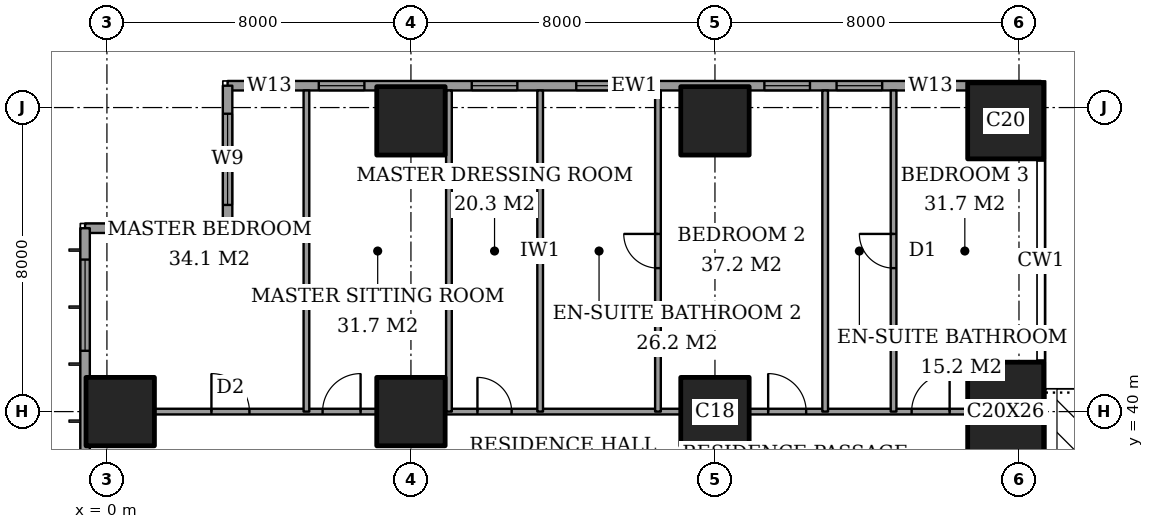
"""IFC4 building model, lengths in metres.
Left out: names, types, materials, properties, quantities, classifications, styles, units other than length and angle.
Written with IfcOpenShell. Run it as: python <this file> out.ifc"""

import sys

from ifc_helpers import new_model, si_unit, direction, frame, frame_2d, origin, origin_2d, place, context, subcontext, project, spatial, rectangle, extrude, element, fill, save


model = new_model("IFC4")
c1 = context("Model", 3, precision=1e-05, world=origin(), true_north=direction((0.0, 1.0)))
c2 = subcontext(c1, "Body", "Model", "MODEL_VIEW")
j1 = project(units=[si_unit("LENGTHUNIT", "METRE"), si_unit("PLANEANGLEUNIT", "RADIAN")], contexts=[c1])
p1 = place(None, origin())
s1 = spatial("IfcSite", under=j1, at=p1, CompositionType="ELEMENT")
p2 = place(p1, origin())
s2 = spatial("IfcBuilding", under=s1, at=p2, CompositionType="ELEMENT")
p3 = place(p2, frame((0.0, 0.0, 182.2)))
s3 = spatial("IfcBuildingStorey", under=s2, at=p3, CompositionType="ELEMENT", Elevation=182.2)
for number, where, z_axis, x_axis in (
    (1, (0.35, 40.0, 0.0), (0.0, 0.0, 1.0), (1.0, 0.0, 0.0)),
    (2, (8.0, 40.0, 0.0), (0.0, 0.0, 1.0), (1.0, 0.0, 0.0)),
    (3, (8.0, 47.65, 0.0), (0.0, 0.0, 1.0), (1.0, 0.0, 0.0)),
    (4, (16.0, 40.0, 0.0), (0.0, 0.0, 1.0), (1.0, 0.0, 0.0)),
    (5, (16.0, 47.65, 0.0), (0.0, 0.0, 1.0), (1.0, 0.0, 0.0)),
):
    element("IfcColumn", number, at=place(p3, frame(where, z_axis=z_axis, x_axis=x_axis)), inside=s3, PredefinedType="COLUMN", context=c2, shape_type="SweptSolid", body=[
        extrude(rectangle(XDim=1.8, YDim=1.8, at=origin_2d()), origin(), (0.0, 0.0, 1.0), 3.6),
    ])
p4 = place(p3, frame((23.65, 40.0, 0.0), z_axis=(0.0, 0.0, 1.0), x_axis=(1.0, 0.0, 0.0)))
e6 = element("IfcColumn", 6, at=p4, inside=s3, PredefinedType="COLUMN", context=c2, shape_type="SweptSolid", body=[
    extrude(rectangle(XDim=2.0, YDim=2.6, at=origin_2d()), origin(), (0.0, 0.0, 1.0), 3.6),
])
p5 = place(p3, frame((23.65, 47.65, 0.0), z_axis=(0.0, 0.0, 1.0), x_axis=(1.0, 0.0, 0.0)))
e7 = element("IfcColumn", 7, at=p5, inside=s3, PredefinedType="COLUMN", context=c2, shape_type="SweptSolid", body=[
    extrude(rectangle(XDim=2.0, YDim=2.0, at=origin_2d()), origin(), (0.0, 0.0, 1.0), 3.6),
])
p6 = place(p3, frame((24.575, 48.575, 0.0), z_axis=(0.0, 0.0, 1.0), x_axis=(-1.0, 0.0, 0.0)))
e8 = element("IfcWall", 8, at=p6, inside=s3, PredefinedType="SOLIDWALL", context=c2, shape_type="SweptSolid", body=[
    extrude(rectangle(XDim=21.4, YDim=0.25, at=frame_2d((10.7, 0.0))), origin(), (0.0, 0.0, 1.0), 3.6),
])
p7 = place(p6, frame((2.3, 0.0, 0.2)))
e9 = element("IfcOpeningElement", 9, at=p7, cuts=e8, PredefinedType="OPENING", context=c2, shape_type="SweptSolid", body=[
    extrude(rectangle(XDim=1.2, YDim=2.4, at=frame_2d((0.6, 1.2))), frame((0.0, 0.135, 0.0), z_axis=(0.0, -1.0, 0.0), x_axis=(1.0, 0.0, 0.0)), (0.0, 0.0, 1.0), 0.27),
])
p8 = place(p6, frame((4.175, 0.0, 0.2)))
e10 = element("IfcOpeningElement", 10, at=p8, cuts=e8, PredefinedType="OPENING", context=c2, shape_type="SweptSolid", body=[
    extrude(rectangle(XDim=1.2, YDim=2.4, at=frame_2d((0.6, 1.2))), frame((0.0, 0.135, 0.0), z_axis=(0.0, -1.0, 0.0), x_axis=(1.0, 0.0, 0.0)), (0.0, 0.0, 1.0), 0.27),
])
p9 = place(p6, frame((6.075, 0.0, 0.2)))
e11 = element("IfcOpeningElement", 11, at=p9, cuts=e8, PredefinedType="OPENING", context=c2, shape_type="SweptSolid", body=[
    extrude(rectangle(XDim=1.2, YDim=2.4, at=frame_2d((0.6, 1.2))), frame((0.0, 0.135, 0.0), z_axis=(0.0, -1.0, 0.0), x_axis=(1.0, 0.0, 0.0)), (0.0, 0.0, 1.0), 0.27),
])
p10 = place(p6, frame((11.025, 0.0, 0.2)))
e12 = element("IfcOpeningElement", 12, at=p10, cuts=e8, PredefinedType="OPENING", context=c2, shape_type="SweptSolid", body=[
    extrude(rectangle(XDim=1.2, YDim=2.4, at=frame_2d((0.6, 1.2))), frame((0.0, 0.135, 0.0), z_axis=(0.0, -1.0, 0.0), x_axis=(1.0, 0.0, 0.0)), (0.0, 0.0, 1.0), 0.27),
])
p11 = place(p6, frame((13.775, 0.0, 0.2)))
e13 = element("IfcOpeningElement", 13, at=p11, cuts=e8, PredefinedType="OPENING", context=c2, shape_type="SweptSolid", body=[
    extrude(rectangle(XDim=1.2, YDim=2.4, at=frame_2d((0.6, 1.2))), frame((0.0, 0.135, 0.0), z_axis=(0.0, -1.0, 0.0), x_axis=(1.0, 0.0, 0.0)), (0.0, 0.0, 1.0), 0.27),
])
p12 = place(p6, frame((17.8, 0.0, 0.2)))
e14 = element("IfcOpeningElement", 14, at=p12, cuts=e8, PredefinedType="OPENING", context=c2, shape_type="SweptSolid", body=[
    extrude(rectangle(XDim=1.2, YDim=2.4, at=frame_2d((0.6, 1.2))), frame((0.0, 0.135, 0.0), z_axis=(0.0, -1.0, 0.0), x_axis=(1.0, 0.0, 0.0)), (0.0, 0.0, 1.0), 0.27),
])
p13 = place(p6, frame((19.7, 0.0, 0.2)))
e15 = element("IfcOpeningElement", 15, at=p13, cuts=e8, PredefinedType="OPENING", context=c2, shape_type="SweptSolid", body=[
    extrude(rectangle(XDim=1.2, YDim=2.4, at=frame_2d((0.6, 1.2))), frame((0.0, 0.135, 0.0), z_axis=(0.0, -1.0, 0.0), x_axis=(1.0, 0.0, 0.0)), (0.0, 0.0, 1.0), 0.27),
])
p14 = place(p3, frame((3.175, 48.575, 0.0), z_axis=(0.0, 0.0, 1.0), x_axis=(0.0, -1.0, 0.0)))
e16 = element("IfcWall", 16, at=p14, inside=s3, PredefinedType="SOLIDWALL", context=c2, shape_type="SweptSolid", body=[
    extrude(rectangle(XDim=3.75, YDim=0.25, at=frame_2d((1.875, 0.0))), origin(), (0.0, 0.0, 1.0), 3.6),
])
p15 = place(p14, frame((0.738, 0.0, 0.2)))
e17 = element("IfcOpeningElement", 17, at=p15, cuts=e16, PredefinedType="OPENING", context=c2, shape_type="SweptSolid", body=[
    extrude(rectangle(XDim=2.4, YDim=2.4, at=frame_2d((1.2, 1.2))), frame((0.0, 0.135, 0.0), z_axis=(0.0, -1.0, 0.0), x_axis=(1.0, 0.0, 0.0)), (0.0, 0.0, 1.0), 0.27),
])
p16 = place(p3, frame((3.175, 44.825, 0.0), z_axis=(0.0, 0.0, 1.0), x_axis=(-1.0, 0.0, 0.0)))
e18 = element("IfcWall", 18, at=p16, inside=s3, PredefinedType="SOLIDWALL", context=c2, shape_type="SweptSolid", body=[
    extrude(rectangle(XDim=3.75, YDim=0.25, at=frame_2d((1.875, 0.0))), origin(), (0.0, 0.0, 1.0), 3.6),
])
p17 = place(p16, frame((0.613, 0.0, 0.2)))
e19 = element("IfcOpeningElement", 19, at=p17, cuts=e18, PredefinedType="OPENING", context=c2, shape_type="SweptSolid", body=[
    extrude(rectangle(XDim=2.4, YDim=2.4, at=frame_2d((1.2, 1.2))), frame((0.0, 0.135, 0.0), z_axis=(0.0, -1.0, 0.0), x_axis=(1.0, 0.0, 0.0)), (0.0, 0.0, 1.0), 0.27),
])
p18 = place(p3, frame((-0.575, 44.825, 0.0), z_axis=(0.0, 0.0, 1.0), x_axis=(0.0, -1.0, 0.0)))
e20 = element("IfcWall", 20, at=p18, inside=s3, PredefinedType="SOLIDWALL", context=c2, shape_type="SweptSolid", body=[
    extrude(rectangle(XDim=41.65, YDim=0.25, at=frame_2d((20.825, 0.0))), origin(), (0.0, 0.0, 1.0), 3.6),
])
p19 = place(p18, frame((0.825, 0.0, 0.2)))
e21 = element("IfcOpeningElement", 21, at=p19, cuts=e20, PredefinedType="OPENING", context=c2, shape_type="SweptSolid", body=[
    extrude(rectangle(XDim=2.4, YDim=2.4, at=frame_2d((1.2, 1.2))), frame((0.0, 0.135, 0.0), z_axis=(0.0, -1.0, 0.0), x_axis=(1.0, 0.0, 0.0)), (0.0, 0.0, 1.0), 0.27),
])
p20 = place(p18, frame((6.05, 0.0, 0.2)))
e22 = element("IfcOpeningElement", 22, at=p20, cuts=e20, PredefinedType="OPENING", context=c2, shape_type="SweptSolid", body=[
    extrude(rectangle(XDim=1.2, YDim=2.4, at=frame_2d((0.6, 1.2))), frame((0.0, 0.135, 0.0), z_axis=(0.0, -1.0, 0.0), x_axis=(1.0, 0.0, 0.0)), (0.0, 0.0, 1.0), 0.27),
])
p21 = place(p18, frame((8.475, 0.0, 0.2)))
e23 = element("IfcOpeningElement", 23, at=p21, cuts=e20, PredefinedType="OPENING", context=c2, shape_type="SweptSolid", body=[
    extrude(rectangle(XDim=2.4, YDim=2.4, at=frame_2d((1.2, 1.2))), frame((0.0, 0.135, 0.0), z_axis=(0.0, -1.0, 0.0), x_axis=(1.0, 0.0, 0.0)), (0.0, 0.0, 1.0), 0.27),
])
p22 = place(p18, frame((15.625, 0.0, 0.2)))
e24 = element("IfcOpeningElement", 24, at=p22, cuts=e20, PredefinedType="OPENING", context=c2, shape_type="SweptSolid", body=[
    extrude(rectangle(XDim=2.4, YDim=2.4, at=frame_2d((1.2, 1.2))), frame((0.0, 0.135, 0.0), z_axis=(0.0, -1.0, 0.0), x_axis=(1.0, 0.0, 0.0)), (0.0, 0.0, 1.0), 0.27),
])
p23 = place(p18, frame((23.625, 0.0, 0.2)))
e25 = element("IfcOpeningElement", 25, at=p23, cuts=e20, PredefinedType="OPENING", context=c2, shape_type="SweptSolid", body=[
    extrude(rectangle(XDim=2.4, YDim=2.4, at=frame_2d((1.2, 1.2))), frame((0.0, 0.135, 0.0), z_axis=(0.0, -1.0, 0.0), x_axis=(1.0, 0.0, 0.0)), (0.0, 0.0, 1.0), 0.27),
])
p24 = place(p18, frame((30.775, 0.0, 0.2)))
e26 = element("IfcOpeningElement", 26, at=p24, cuts=e20, PredefinedType="OPENING", context=c2, shape_type="SweptSolid", body=[
    extrude(rectangle(XDim=2.4, YDim=2.4, at=frame_2d((1.2, 1.2))), frame((0.0, 0.135, 0.0), z_axis=(0.0, -1.0, 0.0), x_axis=(1.0, 0.0, 0.0)), (0.0, 0.0, 1.0), 0.27),
])
p25 = place(p18, frame((34.55, 0.0, 0.2)))
e27 = element("IfcOpeningElement", 27, at=p25, cuts=e20, PredefinedType="OPENING", context=c2, shape_type="SweptSolid", body=[
    extrude(rectangle(XDim=1.2, YDim=2.4, at=frame_2d((0.6, 1.2))), frame((0.0, 0.135, 0.0), z_axis=(0.0, -1.0, 0.0), x_axis=(1.0, 0.0, 0.0)), (0.0, 0.0, 1.0), 0.27),
])
p26 = place(p18, frame((38.425, 0.0, 0.2)))
e28 = element("IfcOpeningElement", 28, at=p26, cuts=e20, PredefinedType="OPENING", context=c2, shape_type="SweptSolid", body=[
    extrude(rectangle(XDim=2.4, YDim=2.4, at=frame_2d((1.2, 1.2))), frame((0.0, 0.135, 0.0), z_axis=(0.0, -1.0, 0.0), x_axis=(1.0, 0.0, 0.0)), (0.0, 0.0, 1.0), 0.27),
])
p27 = place(p3, frame((1.25, 40.0, 0.0), z_axis=(0.0, 0.0, 1.0), x_axis=(1.0, 0.0, 0.0)))
e29 = element("IfcWall", 29, at=p27, inside=s3, PredefinedType="PARTITIONING", context=c2, shape_type="SweptSolid", body=[
    extrude(rectangle(XDim=5.85, YDim=0.15, at=frame_2d((2.925, 0.0))), origin(), (0.0, 0.0, 1.0), 3.35),
])
p28 = place(p27, frame((1.5, 0.0, 0.0)))
e30 = element("IfcOpeningElement", 30, at=p28, cuts=e29, PredefinedType="OPENING", context=c2, shape_type="SweptSolid", body=[
    extrude(rectangle(XDim=1.0, YDim=2.1, at=frame_2d((0.5, 1.05))), frame((0.0, 0.085, 0.0), z_axis=(0.0, -1.0, 0.0), x_axis=(1.0, 0.0, 0.0)), (0.0, 0.0, 1.0), 0.17),
])
p29 = place(p27, frame((4.425, 0.0, 0.0)))
e31 = element("IfcOpeningElement", 31, at=p29, cuts=e29, PredefinedType="OPENING", context=c2, shape_type="SweptSolid", body=[
    extrude(rectangle(XDim=1.0, YDim=2.1, at=frame_2d((0.5, 1.05))), frame((0.0, 0.085, 0.0), z_axis=(0.0, -1.0, 0.0), x_axis=(1.0, 0.0, 0.0)), (0.0, 0.0, 1.0), 0.17),
])
p30 = place(p3, frame((8.9, 40.0, 0.0), z_axis=(0.0, 0.0, 1.0), x_axis=(1.0, 0.0, 0.0)))
e32 = element("IfcWall", 32, at=p30, inside=s3, PredefinedType="PARTITIONING", context=c2, shape_type="SweptSolid", body=[
    extrude(rectangle(XDim=6.2, YDim=0.15, at=frame_2d((3.1, 0.0))), origin(), (0.0, 0.0, 1.0), 3.35),
])
p31 = place(p30, frame((0.85, 0.0, 0.0)))
e33 = element("IfcOpeningElement", 33, at=p31, cuts=e32, PredefinedType="OPENING", context=c2, shape_type="SweptSolid", body=[
    extrude(rectangle(XDim=0.9, YDim=2.1, at=frame_2d((0.45, 1.05))), frame((0.0, 0.085, 0.0), z_axis=(0.0, -1.0, 0.0), x_axis=(1.0, 0.0, 0.0)), (0.0, 0.0, 1.0), 0.17),
])
p32 = place(p3, frame((16.9, 40.0, 0.0), z_axis=(0.0, 0.0, 1.0), x_axis=(1.0, 0.0, 0.0)))
e34 = element("IfcWall", 34, at=p32, inside=s3, PredefinedType="PARTITIONING", context=c2, shape_type="SweptSolid", body=[
    extrude(rectangle(XDim=5.75, YDim=0.15, at=frame_2d((2.875, 0.0))), origin(), (0.0, 0.0, 1.0), 3.35),
])
p33 = place(p32, frame((0.5, 0.0, 0.0)))
e35 = element("IfcOpeningElement", 35, at=p33, cuts=e34, PredefinedType="OPENING", context=c2, shape_type="SweptSolid", body=[
    extrude(rectangle(XDim=1.0, YDim=2.1, at=frame_2d((0.5, 1.05))), frame((0.0, 0.085, 0.0), z_axis=(0.0, -1.0, 0.0), x_axis=(1.0, 0.0, 0.0)), (0.0, 0.0, 1.0), 0.17),
])
p34 = place(p32, frame((4.275, 0.0, 0.0)))
e36 = element("IfcOpeningElement", 36, at=p34, cuts=e34, PredefinedType="OPENING", context=c2, shape_type="SweptSolid", body=[
    extrude(rectangle(XDim=1.0, YDim=2.1, at=frame_2d((0.5, 1.05))), frame((0.0, 0.085, 0.0), z_axis=(0.0, -1.0, 0.0), x_axis=(1.0, 0.0, 0.0)), (0.0, 0.0, 1.0), 0.17),
])
for number, where, z_axis, x_axis in (
    (37, (5.25, 40.0, 0.0), (0.0, 0.0, 1.0), (0.0, 1.0, 0.0)),
    (38, (9.0, 40.0, 0.0), (0.0, 0.0, 1.0), (0.0, 1.0, 0.0)),
    (39, (11.4, 40.0, 0.0), (0.0, 0.0, 1.0), (0.0, 1.0, 0.0)),
):
    element("IfcWall", number, at=place(p3, frame(where, z_axis=z_axis, x_axis=x_axis)), inside=s3, PredefinedType="PARTITIONING", context=c2, shape_type="SweptSolid", body=[
        extrude(rectangle(XDim=8.45, YDim=0.15, at=frame_2d((4.225, 0.0))), origin(), (0.0, 0.0, 1.0), 3.35),
    ])
p35 = place(p3, frame((14.5, 40.0, 0.0), z_axis=(0.0, 0.0, 1.0), x_axis=(0.0, 1.0, 0.0)))
e40 = element("IfcWall", 40, at=p35, inside=s3, PredefinedType="PARTITIONING", context=c2, shape_type="SweptSolid", body=[
    extrude(rectangle(XDim=8.45, YDim=0.15, at=frame_2d((4.225, 0.0))), origin(), (0.0, 0.0, 1.0), 3.35),
])
p36 = place(p35, frame((3.775, 0.0, 0.0)))
e41 = element("IfcOpeningElement", 41, at=p36, cuts=e40, PredefinedType="OPENING", context=c2, shape_type="SweptSolid", body=[
    extrude(rectangle(XDim=0.9, YDim=2.1, at=frame_2d((0.45, 1.05))), frame((0.0, 0.085, 0.0), z_axis=(0.0, -1.0, 0.0), x_axis=(1.0, 0.0, 0.0)), (0.0, 0.0, 1.0), 0.17),
])
p37 = place(p3, frame((18.9, 40.0, 0.0), z_axis=(0.0, 0.0, 1.0), x_axis=(0.0, 1.0, 0.0)))
e42 = element("IfcWall", 42, at=p37, inside=s3, PredefinedType="PARTITIONING", context=c2, shape_type="SweptSolid", body=[
    extrude(rectangle(XDim=8.45, YDim=0.15, at=frame_2d((4.225, 0.0))), origin(), (0.0, 0.0, 1.0), 3.35),
])
p38 = place(p3, frame((20.7, 40.0, 0.0), z_axis=(0.0, 0.0, 1.0), x_axis=(0.0, 1.0, 0.0)))
e43 = element("IfcWall", 43, at=p38, inside=s3, PredefinedType="PARTITIONING", context=c2, shape_type="SweptSolid", body=[
    extrude(rectangle(XDim=8.45, YDim=0.15, at=frame_2d((4.225, 0.0))), origin(), (0.0, 0.0, 1.0), 3.35),
])
p39 = place(p38, frame((3.775, 0.0, 0.0)))
e44 = element("IfcOpeningElement", 44, at=p39, cuts=e43, PredefinedType="OPENING", context=c2, shape_type="SweptSolid", body=[
    extrude(rectangle(XDim=0.9, YDim=2.1, at=frame_2d((0.45, 1.05))), frame((0.0, 0.085, 0.0), z_axis=(0.0, -1.0, 0.0), x_axis=(1.0, 0.0, 0.0)), (0.0, 0.0, 1.0), 0.17),
])
p40 = place(p7, origin())
e45 = element("IfcWindow", 45, at=p40, inside=s3, PartitioningType="SINGLE_PANEL", PredefinedType="WINDOW", context=c2, shape_type="SweptSolid", body=[
    extrude(rectangle(XDim=1.2, YDim=2.4, at=frame_2d((0.6, 1.2))), frame((0.0, 0.03, 0.0), z_axis=(0.0, -1.0, 0.0), x_axis=(1.0, 0.0, 0.0)), (0.0, 0.0, 1.0), 0.06),
])
fill(e9, e45)
p41 = place(p8, origin())
e46 = element("IfcWindow", 46, at=p41, inside=s3, PartitioningType="SINGLE_PANEL", PredefinedType="WINDOW", context=c2, shape_type="SweptSolid", body=[
    extrude(rectangle(XDim=1.2, YDim=2.4, at=frame_2d((0.6, 1.2))), frame((0.0, 0.03, 0.0), z_axis=(0.0, -1.0, 0.0), x_axis=(1.0, 0.0, 0.0)), (0.0, 0.0, 1.0), 0.06),
])
fill(e10, e46)
p42 = place(p9, origin())
e47 = element("IfcWindow", 47, at=p42, inside=s3, PartitioningType="SINGLE_PANEL", PredefinedType="WINDOW", context=c2, shape_type="SweptSolid", body=[
    extrude(rectangle(XDim=1.2, YDim=2.4, at=frame_2d((0.6, 1.2))), frame((0.0, 0.03, 0.0), z_axis=(0.0, -1.0, 0.0), x_axis=(1.0, 0.0, 0.0)), (0.0, 0.0, 1.0), 0.06),
])
fill(e11, e47)
p43 = place(p10, origin())
e48 = element("IfcWindow", 48, at=p43, inside=s3, PartitioningType="SINGLE_PANEL", PredefinedType="WINDOW", context=c2, shape_type="SweptSolid", body=[
    extrude(rectangle(XDim=1.2, YDim=2.4, at=frame_2d((0.6, 1.2))), frame((0.0, 0.03, 0.0), z_axis=(0.0, -1.0, 0.0), x_axis=(1.0, 0.0, 0.0)), (0.0, 0.0, 1.0), 0.06),
])
fill(e12, e48)
p44 = place(p11, origin())
e49 = element("IfcWindow", 49, at=p44, inside=s3, PartitioningType="SINGLE_PANEL", PredefinedType="WINDOW", context=c2, shape_type="SweptSolid", body=[
    extrude(rectangle(XDim=1.2, YDim=2.4, at=frame_2d((0.6, 1.2))), frame((0.0, 0.03, 0.0), z_axis=(0.0, -1.0, 0.0), x_axis=(1.0, 0.0, 0.0)), (0.0, 0.0, 1.0), 0.06),
])
fill(e13, e49)
p45 = place(p12, origin())
e50 = element("IfcWindow", 50, at=p45, inside=s3, PartitioningType="SINGLE_PANEL", PredefinedType="WINDOW", context=c2, shape_type="SweptSolid", body=[
    extrude(rectangle(XDim=1.2, YDim=2.4, at=frame_2d((0.6, 1.2))), frame((0.0, 0.03, 0.0), z_axis=(0.0, -1.0, 0.0), x_axis=(1.0, 0.0, 0.0)), (0.0, 0.0, 1.0), 0.06),
])
fill(e14, e50)
p46 = place(p13, origin())
e51 = element("IfcWindow", 51, at=p46, inside=s3, PartitioningType="SINGLE_PANEL", PredefinedType="WINDOW", context=c2, shape_type="SweptSolid", body=[
    extrude(rectangle(XDim=1.2, YDim=2.4, at=frame_2d((0.6, 1.2))), frame((0.0, 0.03, 0.0), z_axis=(0.0, -1.0, 0.0), x_axis=(1.0, 0.0, 0.0)), (0.0, 0.0, 1.0), 0.06),
])
fill(e15, e51)
p47 = place(p15, origin())
e52 = element("IfcWindow", 52, at=p47, inside=s3, PartitioningType="SINGLE_PANEL", PredefinedType="WINDOW", context=c2, shape_type="SweptSolid", body=[
    extrude(rectangle(XDim=2.4, YDim=2.4, at=frame_2d((1.2, 1.2))), frame((0.0, 0.03, 0.0), z_axis=(0.0, -1.0, 0.0), x_axis=(1.0, 0.0, 0.0)), (0.0, 0.0, 1.0), 0.06),
])
fill(e17, e52)
p48 = place(p17, origin())
e53 = element("IfcWindow", 53, at=p48, inside=s3, PartitioningType="SINGLE_PANEL", PredefinedType="WINDOW", context=c2, shape_type="SweptSolid", body=[
    extrude(rectangle(XDim=2.4, YDim=2.4, at=frame_2d((1.2, 1.2))), frame((0.0, 0.03, 0.0), z_axis=(0.0, -1.0, 0.0), x_axis=(1.0, 0.0, 0.0)), (0.0, 0.0, 1.0), 0.06),
])
fill(e19, e53)
p49 = place(p19, origin())
e54 = element("IfcWindow", 54, at=p49, inside=s3, PartitioningType="SINGLE_PANEL", PredefinedType="WINDOW", context=c2, shape_type="SweptSolid", body=[
    extrude(rectangle(XDim=2.4, YDim=2.4, at=frame_2d((1.2, 1.2))), frame((0.0, 0.03, 0.0), z_axis=(0.0, -1.0, 0.0), x_axis=(1.0, 0.0, 0.0)), (0.0, 0.0, 1.0), 0.06),
])
fill(e21, e54)
p50 = place(p28, origin())
e55 = element("IfcDoor", 55, at=p50, inside=s3, OperationType="SINGLE_SWING_RIGHT", PredefinedType="DOOR", context=c2, shape_type="SweptSolid", body=[
    extrude(rectangle(XDim=1.0, YDim=2.1, at=frame_2d((0.5, 1.05))), frame((0.0, 0.025, 0.0), z_axis=(0.0, -1.0, 0.0), x_axis=(1.0, 0.0, 0.0)), (0.0, 0.0, 1.0), 0.05),
])
fill(e30, e55)
p51 = place(p29, origin())
e56 = element("IfcDoor", 56, at=p51, inside=s3, OperationType="SINGLE_SWING_LEFT", PredefinedType="DOOR", context=c2, shape_type="SweptSolid", body=[
    extrude(rectangle(XDim=1.0, YDim=2.1, at=frame_2d((0.5, 1.05))), frame((0.0, 0.025, 0.0), z_axis=(0.0, -1.0, 0.0), x_axis=(1.0, 0.0, 0.0)), (0.0, 0.0, 1.0), 0.05),
])
fill(e31, e56)
p52 = place(p31, origin())
e57 = element("IfcDoor", 57, at=p52, inside=s3, OperationType="SINGLE_SWING_RIGHT", PredefinedType="DOOR", context=c2, shape_type="SweptSolid", body=[
    extrude(rectangle(XDim=0.9, YDim=2.1, at=frame_2d((0.45, 1.05))), frame((0.0, 0.025, 0.0), z_axis=(0.0, -1.0, 0.0), x_axis=(1.0, 0.0, 0.0)), (0.0, 0.0, 1.0), 0.05),
])
fill(e33, e57)
p53 = place(p36, origin())
e58 = element("IfcDoor", 58, at=p53, inside=s3, OperationType="SINGLE_SWING_LEFT", PredefinedType="DOOR", context=c2, shape_type="SweptSolid", body=[
    extrude(rectangle(XDim=0.9, YDim=2.1, at=frame_2d((0.45, 1.05))), frame((0.0, 0.025, 0.0), z_axis=(0.0, -1.0, 0.0), x_axis=(1.0, 0.0, 0.0)), (0.0, 0.0, 1.0), 0.05),
])
fill(e41, e58)
p54 = place(p33, origin())
e59 = element("IfcDoor", 59, at=p54, inside=s3, OperationType="SINGLE_SWING_RIGHT", PredefinedType="DOOR", context=c2, shape_type="SweptSolid", body=[
    extrude(rectangle(XDim=1.0, YDim=2.1, at=frame_2d((0.5, 1.05))), frame((0.0, 0.025, 0.0), z_axis=(0.0, -1.0, 0.0), x_axis=(1.0, 0.0, 0.0)), (0.0, 0.0, 1.0), 0.05),
])
fill(e35, e59)
p55 = place(p39, origin())
e60 = element("IfcDoor", 60, at=p55, inside=s3, OperationType="SINGLE_SWING_LEFT", PredefinedType="DOOR", context=c2, shape_type="SweptSolid", body=[
    extrude(rectangle(XDim=0.9, YDim=2.1, at=frame_2d((0.45, 1.05))), frame((0.0, 0.025, 0.0), z_axis=(0.0, -1.0, 0.0), x_axis=(1.0, 0.0, 0.0)), (0.0, 0.0, 1.0), 0.05),
])
fill(e44, e60)
p56 = place(p34, origin())
e61 = element("IfcDoor", 61, at=p56, inside=s3, OperationType="SINGLE_SWING_LEFT", PredefinedType="DOOR", context=c2, shape_type="SweptSolid", body=[
    extrude(rectangle(XDim=1.0, YDim=2.1, at=frame_2d((0.5, 1.05))), frame((0.0, 0.025, 0.0), z_axis=(0.0, -1.0, 0.0), x_axis=(1.0, 0.0, 0.0)), (0.0, 0.0, 1.0), 0.05),
])
fill(e36, e61)
save(model, sys.argv[1])
